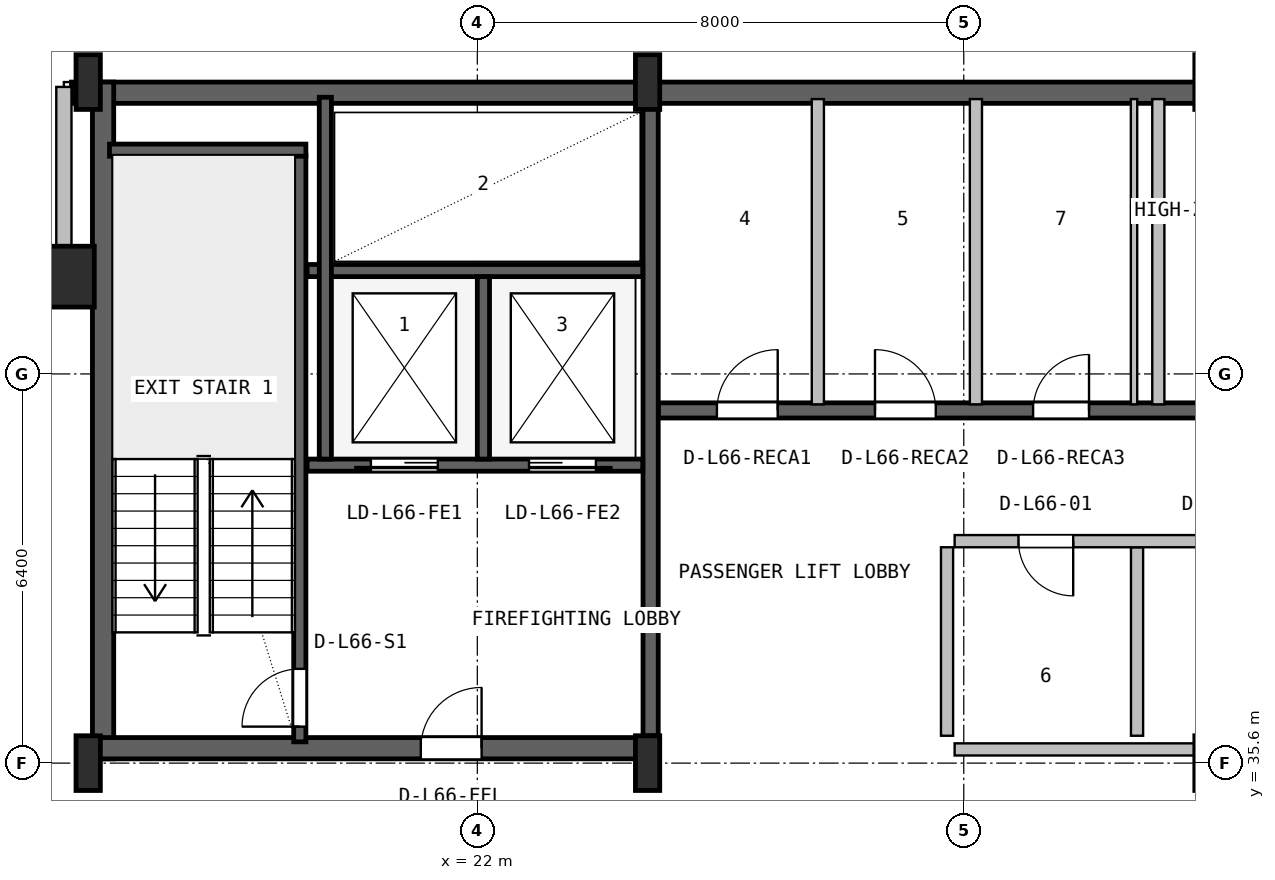
"""IFC4 building model, lengths in metres.
Left out: names, types, materials, properties, quantities, classifications, styles, units other than length and angle.
Written with IfcOpenShell. Run it as: python <this file> out.ifc"""

import sys

from ifc_helpers import new_model, si_unit, direction, frame, frame_2d, origin, origin_2d, place, context, subcontext, project, spatial, rectangle, hollow_rectangle, i_section, extrude, source, transform, mapped, element, fill, save


model = new_model("IFC4")
c1 = context("Model", 3, precision=1e-05, world=origin(), true_north=direction((0.0, 1.0)))
c2 = subcontext(c1, "Body", "Model", "MODEL_VIEW")
j1 = project(units=[si_unit("LENGTHUNIT", "METRE"), si_unit("PLANEANGLEUNIT", "RADIAN")], contexts=[c1])
p1 = place(None, origin())
s1 = spatial("IfcSite", under=j1, at=p1, CompositionType="ELEMENT")
p2 = place(p1, origin())
s2 = spatial("IfcBuilding", under=s1, at=p2, CompositionType="ELEMENT")
p3 = place(p2, frame((0.0, 0.0, 266.0)))
s3 = spatial("IfcBuildingStorey", under=s2, at=p3, CompositionType="ELEMENT", Elevation=266.0)
p4 = place(p3, frame((15.325, 46.625, 0.0), z_axis=(0.0, 0.0, 1.0), x_axis=(1.0, 0.0, 0.0)))
e1 = element("IfcWall", 1, at=p4, inside=s3, PredefinedType="SHEAR", context=c2, shape_type="SweptSolid", body=[
    extrude(rectangle(XDim=37.35, YDim=0.35, at=frame_2d((18.675, 0.0))), origin(), (0.0, 0.0, 1.0), 3.55),
])
p5 = place(p3, frame((15.845, 35.67, 0.0), z_axis=(0.0, 0.0, 1.0), x_axis=(0.0, 1.0, 0.0)))
e2 = element("IfcWall", 2, at=p5, inside=s3, PredefinedType="SHEAR", context=c2, shape_type="SweptSolid", body=[
    extrude(rectangle(XDim=11.13, YDim=0.35, at=frame_2d((5.565, 0.0))), origin(), (0.0, 0.0, 1.0), 3.55),
])
p6 = place(p3, frame((15.67, 35.845, 0.0), z_axis=(0.0, 0.0, 1.0), x_axis=(1.0, 0.0, 0.0)))
e3 = element("IfcWall", 3, at=p6, inside=s3, PredefinedType="SHEAR", context=c2, shape_type="SweptSolid", body=[
    extrude(rectangle(XDim=9.13, YDim=0.35, at=frame_2d((4.565, 0.0))), origin(), (0.0, 0.0, 1.0), 3.55),
])
p7 = place(p6, frame((5.4, 0.0, 0.0)))
e4 = element("IfcOpeningElement", 4, at=p7, cuts=e3, PredefinedType="OPENING", context=c2, shape_type="SweptSolid", body=[
    extrude(rectangle(XDim=1.0, YDim=2.1, at=frame_2d((0.5, 1.05))), frame((0.0, 0.185, 0.0), z_axis=(0.0, -1.0, 0.0), x_axis=(1.0, 0.0, 0.0)), (0.0, 0.0, 1.0), 0.37),
])
m1 = source(origin(), c2, "Body", "SweptSolid", [
    extrude(i_section(OverallWidth=0.4, OverallDepth=0.9, WebThickness=0.016, FlangeThickness=0.028, FilletRadius=0.016, at=origin_2d()), origin(), (0.0, 0.0, 1.0), 3.8),
])
for number, where, z_axis, x_axis in (
    (5, (15.6, 35.6, 0.0), (0.0, 0.0, 1.0), (1.0, 0.0, 0.0)),
    (6, (15.6, 46.8, 0.0), (0.0, 0.0, 1.0), (1.0, 0.0, 0.0)),
    (7, (24.8, 35.6, 0.0), (0.0, 0.0, 1.0), (1.0, 0.0, 0.0)),
    (8, (24.8, 46.8, 0.0), (0.0, 0.0, 1.0), (1.0, 0.0, 0.0)),
):
    element("IfcColumn", number, at=place(p3, frame(where, z_axis=z_axis, x_axis=x_axis)), inside=s3, PredefinedType="COLUMN", context=c2, shape_type="MappedRepresentation", body=[
        mapped(m1, transform((0.0, 0.0, 0.0), x_axis=(1.0, 0.0, 0.0), y_axis=(0.0, 1.0, 0.0), z_axis=(0.0, 0.0, 1.0), scale=1.0)),
    ])
m2 = source(origin(), c2, "Body", "SweptSolid", [
    extrude(hollow_rectangle(XDim=1.0, YDim=1.0, WallThickness=0.04, at=origin_2d()), origin(), (0.0, 0.0, 1.0), 3.8),
])
p8 = place(p3, frame((15.2, 43.6, 0.0), z_axis=(0.0, 0.0, 1.0), x_axis=(1.0, 0.0, 0.0)))
e9 = element("IfcColumn", 9, at=p8, inside=s3, PredefinedType="COLUMN", context=c2, shape_type="MappedRepresentation", body=[
    mapped(m2, transform((0.0, 0.0, 0.0), x_axis=(1.0, 0.0, 0.0), y_axis=(0.0, 1.0, 0.0), z_axis=(0.0, 0.0, 1.0), scale=1.0)),
])
p9 = place(p3, frame((12.08, 43.6, 0.0), z_axis=(0.0, 0.0, 1.0), x_axis=(1.0, 0.0, 0.0)))
e10 = element("IfcWall", 10, at=p9, inside=s3, PredefinedType="SOLIDWALL", context=c2, shape_type="SweptSolid", body=[
    extrude(rectangle(XDim=2.99, YDim=0.25, at=frame_2d((1.495, 0.0))), origin(), (0.0, 0.0, 1.0), 3.53),
])
p10 = place(p3, frame((15.2, 43.52, 0.0), z_axis=(0.0, 0.0, 1.0), x_axis=(0.0, 1.0, 0.0)))
e11 = element("IfcWall", 11, at=p10, inside=s3, PredefinedType="SOLIDWALL", context=c2, shape_type="SweptSolid", body=[
    extrude(rectangle(XDim=3.2, YDim=0.25, at=frame_2d((1.6, 0.0))), origin(), (0.0, 0.0, 1.0), 3.171),
])
p11 = place(p3, frame((19.08, 35.95, 0.0), z_axis=(0.0, 0.0, 1.0), x_axis=(0.0, 1.0, 0.0)))
e12 = element("IfcWall", 12, at=p11, inside=s3, PredefinedType="SHEAR", context=c2, shape_type="SweptSolid", body=[
    extrude(rectangle(XDim=9.65, YDim=0.2, at=frame_2d((4.825, 0.0))), origin(), (0.0, 0.0, 1.0), 3.55),
])
p12 = place(p11, frame((0.25, 0.0, 0.0)))
e13 = element("IfcOpeningElement", 13, at=p12, cuts=e12, PredefinedType="OPENING", context=c2, shape_type="SweptSolid", body=[
    extrude(rectangle(XDim=0.95, YDim=2.1, at=frame_2d((0.475, 1.05))), frame((0.0, 0.11, 0.0), z_axis=(0.0, -1.0, 0.0), x_axis=(1.0, 0.0, 0.0)), (0.0, 0.0, 1.0), 0.22),
])
p13 = place(p3, frame((15.95, 45.68, 0.0), z_axis=(0.0, 0.0, 1.0), x_axis=(1.0, 0.0, 0.0)))
e14 = element("IfcWall", 14, at=p13, inside=s3, PredefinedType="SHEAR", context=c2, shape_type="SweptSolid", body=[
    extrude(rectangle(XDim=3.23, YDim=0.2, at=frame_2d((1.615, 0.0))), origin(), (0.0, 0.0, 1.0), 3.55),
])
p14 = place(p3, frame((24.85, 36.05, 0.0), z_axis=(0.0, 0.0, 1.0), x_axis=(0.0, 1.0, 0.0)))
e15 = element("IfcWall", 15, at=p14, inside=s3, PredefinedType="SHEAR", context=c2, shape_type="SweptSolid", body=[
    extrude(rectangle(XDim=10.45, YDim=0.25, at=frame_2d((5.225, 0.0))), origin(), (0.0, 0.0, 1.0), 3.55),
])
p15 = place(p3, frame((19.2, 40.5, 0.0), z_axis=(0.0, 0.0, 1.0), x_axis=(1.0, 0.0, 0.0)))
e16 = element("IfcWall", 16, at=p15, inside=s3, PredefinedType="SHEAR", context=c2, shape_type="SweptSolid", body=[
    extrude(rectangle(XDim=5.52, YDim=0.2, at=frame_2d((2.76, 0.0))), origin(), (0.0, 0.0, 1.0), 3.55),
])
p16 = place(p15, frame((1.05, 0.0, 0.0)))
e17 = element("IfcOpeningElement", 17, at=p16, cuts=e16, PredefinedType="OPENING", context=c2, shape_type="SweptSolid", body=[
    extrude(rectangle(XDim=1.1, YDim=2.18, at=frame_2d((0.55, 1.09))), frame((0.0, 0.11, 0.0), z_axis=(0.0, -1.0, 0.0), x_axis=(1.0, 0.0, 0.0)), (0.0, 0.0, 1.0), 0.22),
])
p17 = place(p15, frame((3.65, 0.0, 0.0)))
e18 = element("IfcOpeningElement", 18, at=p17, cuts=e16, PredefinedType="OPENING", context=c2, shape_type="SweptSolid", body=[
    extrude(rectangle(XDim=1.1, YDim=2.18, at=frame_2d((0.55, 1.09))), frame((0.0, 0.11, 0.0), z_axis=(0.0, -1.0, 0.0), x_axis=(1.0, 0.0, 0.0)), (0.0, 0.0, 1.0), 0.22),
])
p18 = place(p3, frame((19.2, 43.7, 0.0), z_axis=(0.0, 0.0, 1.0), x_axis=(1.0, 0.0, 0.0)))
e19 = element("IfcWall", 19, at=p18, inside=s3, PredefinedType="SHEAR", context=c2, shape_type="SweptSolid", body=[
    extrude(rectangle(XDim=5.52, YDim=0.2, at=frame_2d((2.76, 0.0))), origin(), (0.0, 0.0, 1.0), 3.55),
])
p19 = place(p3, frame((22.1, 40.6, 0.0), z_axis=(0.0, 0.0, 1.0), x_axis=(0.0, 1.0, 0.0)))
e20 = element("IfcWall", 20, at=p19, inside=s3, PredefinedType="SHEAR", context=c2, shape_type="SweptSolid", body=[
    extrude(rectangle(XDim=3.0, YDim=0.2, at=frame_2d((1.5, 0.0))), origin(), (0.0, 0.0, 1.0), 3.55),
])
p20 = place(p3, frame((19.5, 40.6, 0.0), z_axis=(0.0, 0.0, 1.0), x_axis=(0.0, 1.0, 0.0)))
e21 = element("IfcWall", 21, at=p20, inside=s3, PredefinedType="SHEAR", context=c2, shape_type="SweptSolid", body=[
    extrude(rectangle(XDim=5.95, YDim=0.2, at=frame_2d((2.975, 0.0))), origin(), (0.0, 0.0, 1.0), 3.55),
])
p21 = place(p3, frame((24.98, 41.4, 0.0), z_axis=(0.0, 0.0, 1.0), x_axis=(1.0, 0.0, 0.0)))
e22 = element("IfcWall", 22, at=p21, inside=s3, PredefinedType="SHEAR", context=c2, shape_type="SweptSolid", body=[
    extrude(rectangle(XDim=23.82, YDim=0.25, at=frame_2d((11.91, 0.0))), origin(), (0.0, 0.0, 1.0), 3.55),
])
p22 = place(p21, frame((16.87, 0.0, 0.0)))
e23 = element("IfcOpeningElement", 23, at=p22, cuts=e22, PredefinedType="OPENING", context=c2, shape_type="SweptSolid", body=[
    extrude(rectangle(XDim=1.1, YDim=2.18, at=frame_2d((0.55, 1.09))), frame((0.0, 0.135, 0.0), z_axis=(0.0, -1.0, 0.0), x_axis=(1.0, 0.0, 0.0)), (0.0, 0.0, 1.0), 0.27),
])
p23 = place(p21, frame((19.47, 0.0, 0.0)))
e24 = element("IfcOpeningElement", 24, at=p23, cuts=e22, PredefinedType="OPENING", context=c2, shape_type="SweptSolid", body=[
    extrude(rectangle(XDim=1.1, YDim=2.18, at=frame_2d((0.55, 1.09))), frame((0.0, 0.135, 0.0), z_axis=(0.0, -1.0, 0.0), x_axis=(1.0, 0.0, 0.0)), (0.0, 0.0, 1.0), 0.27),
])
p24 = place(p21, frame((22.07, 0.0, 0.0)))
e25 = element("IfcOpeningElement", 25, at=p24, cuts=e22, PredefinedType="OPENING", context=c2, shape_type="SweptSolid", body=[
    extrude(rectangle(XDim=1.1, YDim=2.18, at=frame_2d((0.55, 1.09))), frame((0.0, 0.135, 0.0), z_axis=(0.0, -1.0, 0.0), x_axis=(1.0, 0.0, 0.0)), (0.0, 0.0, 1.0), 0.27),
])
p25 = place(p21, frame((0.96, 0.0, 0.0)))
e26 = element("IfcOpeningElement", 26, at=p25, cuts=e22, PredefinedType="OPENING", context=c2, shape_type="SweptSolid", body=[
    extrude(rectangle(XDim=1.0, YDim=2.08, at=frame_2d((0.5, 1.04))), frame((0.0, 0.135, 0.0), z_axis=(0.0, -1.0, 0.0), x_axis=(1.0, 0.0, 0.0)), (0.0, 0.0, 1.0), 0.27),
])
p26 = place(p21, frame((3.56, 0.0, 0.0)))
e27 = element("IfcOpeningElement", 27, at=p26, cuts=e22, PredefinedType="OPENING", context=c2, shape_type="SweptSolid", body=[
    extrude(rectangle(XDim=1.0, YDim=2.08, at=frame_2d((0.5, 1.04))), frame((0.0, 0.135, 0.0), z_axis=(0.0, -1.0, 0.0), x_axis=(1.0, 0.0, 0.0)), (0.0, 0.0, 1.0), 0.27),
])
p27 = place(p21, frame((6.16, 0.0, 0.0)))
e28 = element("IfcOpeningElement", 28, at=p27, cuts=e22, PredefinedType="OPENING", context=c2, shape_type="SweptSolid", body=[
    extrude(rectangle(XDim=0.92, YDim=2.08, at=frame_2d((0.46, 1.04))), frame((0.0, 0.135, 0.0), z_axis=(0.0, -1.0, 0.0), x_axis=(1.0, 0.0, 0.0)), (0.0, 0.0, 1.0), 0.27),
])
p28 = place(p21, frame((11.56, 0.0, 0.0)))
e29 = element("IfcOpeningElement", 29, at=p28, cuts=e22, PredefinedType="OPENING", context=c2, shape_type="SweptSolid", body=[
    extrude(rectangle(XDim=1.0, YDim=2.08, at=frame_2d((0.5, 1.04))), frame((0.0, 0.135, 0.0), z_axis=(0.0, -1.0, 0.0), x_axis=(1.0, 0.0, 0.0)), (0.0, 0.0, 1.0), 0.27),
])
p29 = place(p3, frame((29.85, 35.825, 0.0), z_axis=(0.0, 0.0, 1.0), x_axis=(1.0, 0.0, 0.0)))
e30 = element("IfcWall", 30, at=p29, inside=s3, PredefinedType="SOLIDWALL", context=c2, shape_type="SweptSolid", body=[
    extrude(rectangle(XDim=13.7, YDim=0.2, at=frame_2d((6.85, 0.0))), origin(), (0.0, 0.0, 1.0), 2.575),
])
p30 = place(p3, frame((32.85, 36.05, 0.0), z_axis=(0.0, 0.0, 1.0), x_axis=(0.0, 1.0, 0.0)))
e31 = element("IfcWall", 31, at=p30, inside=s3, PredefinedType="PLUMBINGWALL", context=c2, shape_type="SweptSolid", body=[
    extrude(rectangle(XDim=3.1, YDim=0.2, at=frame_2d((1.55, 0.0))), origin(), (0.0, 0.0, 1.0), 3.53),
])
p31 = place(p3, frame((29.85, 39.25, 0.0), z_axis=(0.0, 0.0, 1.0), x_axis=(1.0, 0.0, 0.0)))
e32 = element("IfcWall", 32, at=p31, inside=s3, PredefinedType="SOLIDWALL", context=c2, shape_type="SweptSolid", body=[
    extrude(rectangle(XDim=13.7, YDim=0.2, at=frame_2d((6.85, 0.0))), origin(), (0.0, 0.0, 1.0), 3.53),
])
p32 = place(p31, frame((1.05, 0.0, 0.0)))
e33 = element("IfcOpeningElement", 33, at=p32, cuts=e32, PredefinedType="OPENING", context=c2, shape_type="SweptSolid", body=[
    extrude(rectangle(XDim=0.9, YDim=2.06, at=frame_2d((0.45, 1.03))), frame((0.0, 0.11, 0.0), z_axis=(0.0, -1.0, 0.0), x_axis=(1.0, 0.0, 0.0)), (0.0, 0.0, 1.0), 0.22),
])
p33 = place(p31, frame((4.05, 0.0, 0.0)))
e34 = element("IfcOpeningElement", 34, at=p33, cuts=e32, PredefinedType="OPENING", context=c2, shape_type="SweptSolid", body=[
    extrude(rectangle(XDim=0.9, YDim=2.06, at=frame_2d((0.45, 1.03))), frame((0.0, 0.11, 0.0), z_axis=(0.0, -1.0, 0.0), x_axis=(1.0, 0.0, 0.0)), (0.0, 0.0, 1.0), 0.22),
])
p34 = place(p31, frame((6.85, 0.0, 0.0)))
e35 = element("IfcOpeningElement", 35, at=p34, cuts=e32, PredefinedType="OPENING", context=c2, shape_type="SweptSolid", body=[
    extrude(rectangle(XDim=0.9, YDim=2.06, at=frame_2d((0.45, 1.03))), frame((0.0, 0.11, 0.0), z_axis=(0.0, -1.0, 0.0), x_axis=(1.0, 0.0, 0.0)), (0.0, 0.0, 1.0), 0.22),
])
p35 = place(p31, frame((9.535, 0.0, 0.0)))
e36 = element("IfcOpeningElement", 36, at=p35, cuts=e32, PredefinedType="OPENING", context=c2, shape_type="SweptSolid", body=[
    extrude(rectangle(XDim=0.88, YDim=2.06, at=frame_2d((0.44, 1.03))), frame((0.0, 0.11, 0.0), z_axis=(0.0, -1.0, 0.0), x_axis=(1.0, 0.0, 0.0)), (0.0, 0.0, 1.0), 0.22),
])
p36 = place(p31, frame((11.925, 0.0, 0.0)))
e37 = element("IfcOpeningElement", 37, at=p36, cuts=e32, PredefinedType="OPENING", context=c2, shape_type="SweptSolid", body=[
    extrude(rectangle(XDim=1.2, YDim=2.1, at=frame_2d((0.6, 1.05))), frame((0.0, 0.11, 0.0), z_axis=(0.0, -1.0, 0.0), x_axis=(1.0, 0.0, 0.0)), (0.0, 0.0, 1.0), 0.22),
])
p37 = place(p3, frame((29.725, 36.05, 0.0), z_axis=(0.0, 0.0, 1.0), x_axis=(0.0, 1.0, 0.0)))
e38 = element("IfcWall", 38, at=p37, inside=s3, PredefinedType="PLUMBINGWALL", context=c2, shape_type="SweptSolid", body=[
    extrude(rectangle(XDim=3.1, YDim=0.2, at=frame_2d((1.55, 0.0))), origin(), (0.0, 0.0, 1.0), 3.53),
])
for number, where, z_axis, x_axis in (
    (39, (27.6, 41.5, 0.0), (0.0, 0.0, 1.0), (0.0, 1.0, 0.0)),
    (40, (30.2, 41.5, 0.0), (0.0, 0.0, 1.0), (0.0, 1.0, 0.0)),
):
    element("IfcWall", number, at=place(p3, frame(where, z_axis=z_axis, x_axis=x_axis)), inside=s3, PredefinedType="SOLIDWALL", context=c2, shape_type="SweptSolid", body=[
        extrude(rectangle(XDim=5.02, YDim=0.2, at=frame_2d((2.51, 0.0))), origin(), (0.0, 0.0, 1.0), 3.53),
    ])
p38 = place(p3, frame((32.8, 41.5, 0.0), z_axis=(0.0, 0.0, 1.0), x_axis=(0.0, 1.0, 0.0)))
e41 = element("IfcWall", 41, at=p38, inside=s3, PredefinedType="PARTITIONING", context=c2, shape_type="SweptSolid", body=[
    extrude(rectangle(XDim=5.02, YDim=0.105, at=frame_2d((2.51, 0.0))), origin(), (0.0, 0.0, 1.0), 3.53),
])
p39 = place(p3, frame((33.2, 41.5, 0.0), z_axis=(0.0, 0.0, 1.0), x_axis=(0.0, 1.0, 0.0)))
e42 = element("IfcWall", 42, at=p39, inside=s3, PredefinedType="SOLIDWALL", context=c2, shape_type="SweptSolid", body=[
    extrude(rectangle(XDim=5.02, YDim=0.2, at=frame_2d((2.51, 0.0))), origin(), (0.0, 0.0, 1.0), 3.53),
])
m3 = source(origin(), c2, "Body", "SweptSolid", [
    extrude(rectangle(XDim=0.95, YDim=2.1, at=frame_2d((0.475, 1.05))), frame((0.0, 0.025, 0.0), z_axis=(0.0, -1.0, 0.0), x_axis=(1.0, 0.0, 0.0)), (0.0, 0.0, 1.0), 0.05),
])
p40 = place(p12, origin())
e43 = element("IfcDoor", 43, at=p40, inside=s3, OperationType="SINGLE_SWING_LEFT", PredefinedType="DOOR", context=c2, shape_type="MappedRepresentation", body=[
    mapped(m3, transform((0.0, 0.0, 0.0), x_axis=(1.0, 0.0, 0.0), y_axis=(0.0, 1.0, 0.0), z_axis=(0.0, 0.0, 1.0), scale=1.0)),
])
fill(e13, e43)
m4 = source(origin(), c2, "Body", "SweptSolid", [
    extrude(rectangle(XDim=1.0, YDim=2.1, at=frame_2d((0.5, 1.05))), frame((0.0, 0.025, 0.0), z_axis=(0.0, -1.0, 0.0), x_axis=(1.0, 0.0, 0.0)), (0.0, 0.0, 1.0), 0.05),
])
p41 = place(p7, origin())
e44 = element("IfcDoor", 44, at=p41, inside=s3, OperationType="SINGLE_SWING_RIGHT", PredefinedType="DOOR", context=c2, shape_type="MappedRepresentation", body=[
    mapped(m4, transform((0.0, 0.0, 0.0), x_axis=(1.0, 0.0, 0.0), y_axis=(0.0, 1.0, 0.0), z_axis=(0.0, 0.0, 1.0), scale=1.0)),
])
fill(e4, e44)
m5 = source(origin(), c2, "Body", "SweptSolid", [
    extrude(rectangle(XDim=1.1, YDim=2.18, at=frame_2d((0.55, 1.09))), frame((0.0, 0.025, 0.0), z_axis=(0.0, -1.0, 0.0), x_axis=(1.0, 0.0, 0.0)), (0.0, 0.0, 1.0), 0.05),
])
p42 = place(p16, frame((1.1, 0.0, 0.0), z_axis=(0.0, 0.0, 1.0), x_axis=(-1.0, 0.0, 0.0)))
e45 = element("IfcDoor", 45, at=p42, inside=s3, OperationType="SLIDING_TO_LEFT", PredefinedType="DOOR", context=c2, shape_type="MappedRepresentation", body=[
    mapped(m5, transform((0.0, 0.0, 0.0), x_axis=(1.0, 0.0, 0.0), y_axis=(0.0, 1.0, 0.0), z_axis=(0.0, 0.0, 1.0), scale=1.0)),
])
fill(e17, e45)
p43 = place(p17, frame((1.1, 0.0, 0.0), z_axis=(0.0, 0.0, 1.0), x_axis=(-1.0, 0.0, 0.0)))
e46 = element("IfcDoor", 46, at=p43, inside=s3, OperationType="SLIDING_TO_RIGHT", PredefinedType="DOOR", context=c2, shape_type="MappedRepresentation", body=[
    mapped(m5, transform((0.0, 0.0, 0.0), x_axis=(1.0, 0.0, 0.0), y_axis=(0.0, 1.0, 0.0), z_axis=(0.0, 0.0, 1.0), scale=1.0)),
])
fill(e18, e46)
m6 = source(origin(), c2, "Body", "SweptSolid", [
    extrude(rectangle(XDim=1.0, YDim=2.08, at=frame_2d((0.5, 1.04))), frame((0.0, 0.025, 0.0), z_axis=(0.0, -1.0, 0.0), x_axis=(1.0, 0.0, 0.0)), (0.0, 0.0, 1.0), 0.05),
])
p44 = place(p25, origin())
e47 = element("IfcDoor", 47, at=p44, inside=s3, OperationType="SINGLE_SWING_RIGHT", PredefinedType="DOOR", context=c2, shape_type="MappedRepresentation", body=[
    mapped(m6, transform((0.0, 0.0, 0.0), x_axis=(1.0, 0.0, 0.0), y_axis=(0.0, 1.0, 0.0), z_axis=(0.0, 0.0, 1.0), scale=1.0)),
])
fill(e26, e47)
p45 = place(p26, origin())
e48 = element("IfcDoor", 48, at=p45, inside=s3, OperationType="SINGLE_SWING_LEFT", PredefinedType="DOOR", context=c2, shape_type="MappedRepresentation", body=[
    mapped(m6, transform((0.0, 0.0, 0.0), x_axis=(1.0, 0.0, 0.0), y_axis=(0.0, 1.0, 0.0), z_axis=(0.0, 0.0, 1.0), scale=1.0)),
])
fill(e27, e48)
m7 = source(origin(), c2, "Body", "SweptSolid", [
    extrude(rectangle(XDim=0.92, YDim=2.08, at=frame_2d((0.46, 1.04))), frame((0.0, 0.025, 0.0), z_axis=(0.0, -1.0, 0.0), x_axis=(1.0, 0.0, 0.0)), (0.0, 0.0, 1.0), 0.05),
])
p46 = place(p27, origin())
e49 = element("IfcDoor", 49, at=p46, inside=s3, OperationType="SINGLE_SWING_RIGHT", PredefinedType="DOOR", context=c2, shape_type="MappedRepresentation", body=[
    mapped(m7, transform((0.0, 0.0, 0.0), x_axis=(1.0, 0.0, 0.0), y_axis=(0.0, 1.0, 0.0), z_axis=(0.0, 0.0, 1.0), scale=1.0)),
])
fill(e28, e49)
m8 = source(origin(), c2, "Body", "SweptSolid", [
    extrude(rectangle(XDim=0.9, YDim=2.06, at=frame_2d((0.45, 1.03))), frame((0.0, 0.025, 0.0), z_axis=(0.0, -1.0, 0.0), x_axis=(1.0, 0.0, 0.0)), (0.0, 0.0, 1.0), 0.05),
])
p47 = place(p32, frame((0.9, 0.0, 0.0), z_axis=(0.0, 0.0, 1.0), x_axis=(-1.0, 0.0, 0.0)))
e50 = element("IfcDoor", 50, at=p47, inside=s3, OperationType="SINGLE_SWING_RIGHT", PredefinedType="DOOR", context=c2, shape_type="MappedRepresentation", body=[
    mapped(m8, transform((0.0, 0.0, 0.0), x_axis=(1.0, 0.0, 0.0), y_axis=(0.0, 1.0, 0.0), z_axis=(0.0, 0.0, 1.0), scale=1.0)),
])
fill(e33, e50)
save(model, sys.argv[1])
